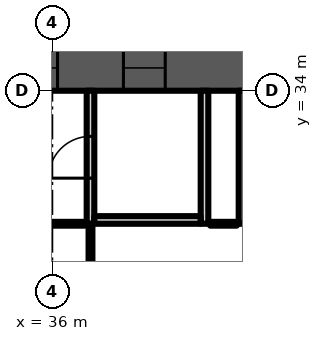
"""IFC4 building model, lengths in metres.
Left out: names, types, materials, properties, quantities, classifications, styles, units other than length and angle.
Written with IfcOpenShell. Run it as: python <this file> out.ifc"""

import sys

from ifc_helpers import new_model, si_unit, direction, frame, frame_2d, origin, place, context, subcontext, project, spatial, rectangle, extrude, element, fill, save


model = new_model("IFC4")
c1 = context("Model", 3, precision=1e-05, world=origin(), true_north=direction((0.0, 1.0)))
c2 = subcontext(c1, "Body", "Model", "MODEL_VIEW")
j1 = project(units=[si_unit("LENGTHUNIT", "METRE"), si_unit("PLANEANGLEUNIT", "RADIAN")], contexts=[c1])
p1 = place(None, origin())
s1 = spatial("IfcSite", under=j1, at=p1, CompositionType="ELEMENT")
p2 = place(p1, origin())
s2 = spatial("IfcBuilding", under=s1, at=p2, CompositionType="ELEMENT")
p3 = place(p2, frame((0.0, 0.0, 81.1)))
s3 = spatial("IfcBuildingStorey", under=s2, at=p3, CompositionType="ELEMENT", Elevation=81.1)
p4 = place(p3, frame((9.0, 34.6, 0.0), z_axis=(0.0, 0.0, 1.0), x_axis=(1.0, 0.0, 0.0)))
e1 = element("IfcWall", 1, at=p4, inside=s3, PredefinedType="SHEAR", context=c2, shape_type="SweptSolid", body=[
    extrude(rectangle(XDim=56.0, YDim=1.2, at=frame_2d((28.0, 0.0))), origin(), (0.0, 0.0, 1.0), 3.6),
])
p5 = place(p4, frame((2.0, 0.0, 0.0)))
e2 = element("IfcOpeningElement", 2, at=p5, cuts=e1, PredefinedType="OPENING", context=c2, shape_type="SweptSolid", body=[
    extrude(rectangle(XDim=1.0, YDim=2.1, at=frame_2d((0.5, 1.05))), frame((0.0, 0.61, 0.0), z_axis=(0.0, -1.0, 0.0), x_axis=(1.0, 0.0, 0.0)), (0.0, 0.0, 1.0), 1.22),
])
p6 = place(p4, frame((4.6, 0.0, 0.0)))
e3 = element("IfcOpeningElement", 3, at=p6, cuts=e1, PredefinedType="OPENING", context=c2, shape_type="SweptSolid", body=[
    extrude(rectangle(XDim=1.0, YDim=2.1, at=frame_2d((0.5, 1.05))), frame((0.0, 0.61, 0.0), z_axis=(0.0, -1.0, 0.0), x_axis=(1.0, 0.0, 0.0)), (0.0, 0.0, 1.0), 1.22),
])
p7 = place(p4, frame((7.867, 0.0, 0.0)))
e4 = element("IfcOpeningElement", 4, at=p7, cuts=e1, PredefinedType="OPENING", context=c2, shape_type="SweptSolid", body=[
    extrude(rectangle(XDim=1.1, YDim=2.1, at=frame_2d((0.55, 1.05))), frame((0.0, 0.61, 0.0), z_axis=(0.0, -1.0, 0.0), x_axis=(1.0, 0.0, 0.0)), (0.0, 0.0, 1.0), 1.22),
])
p8 = place(p4, frame((12.033, 0.0, 0.0)))
e5 = element("IfcOpeningElement", 5, at=p8, cuts=e1, PredefinedType="OPENING", context=c2, shape_type="SweptSolid", body=[
    extrude(rectangle(XDim=1.1, YDim=2.1, at=frame_2d((0.55, 1.05))), frame((0.0, 0.61, 0.0), z_axis=(0.0, -1.0, 0.0), x_axis=(1.0, 0.0, 0.0)), (0.0, 0.0, 1.0), 1.22),
])
p9 = place(p4, frame((9.8, 0.0, 0.0)))
e6 = element("IfcOpeningElement", 6, at=p9, cuts=e1, PredefinedType="OPENING", context=c2, shape_type="SweptSolid", body=[
    extrude(rectangle(XDim=1.4, YDim=2.1, at=frame_2d((0.7, 1.05))), frame((0.0, 0.61, 0.0), z_axis=(0.0, -1.0, 0.0), x_axis=(1.0, 0.0, 0.0)), (0.0, 0.0, 1.0), 1.22),
])
p10 = place(p4, frame((14.65, 0.0, 0.0)))
e7 = element("IfcOpeningElement", 7, at=p10, cuts=e1, PredefinedType="OPENING", context=c2, shape_type="SweptSolid", body=[
    extrude(rectangle(XDim=1.2, YDim=2.1, at=frame_2d((0.6, 1.05))), frame((0.0, 0.61, 0.0), z_axis=(0.0, -1.0, 0.0), x_axis=(1.0, 0.0, 0.0)), (0.0, 0.0, 1.0), 1.22),
])
p11 = place(p4, frame((21.867, 0.0, 0.0)))
e8 = element("IfcOpeningElement", 8, at=p11, cuts=e1, PredefinedType="OPENING", context=c2, shape_type="SweptSolid", body=[
    extrude(rectangle(XDim=1.1, YDim=2.1, at=frame_2d((0.55, 1.05))), frame((0.0, 0.61, 0.0), z_axis=(0.0, -1.0, 0.0), x_axis=(1.0, 0.0, 0.0)), (0.0, 0.0, 1.0), 1.22),
])
p12 = place(p4, frame((26.033, 0.0, 0.0)))
e9 = element("IfcOpeningElement", 9, at=p12, cuts=e1, PredefinedType="OPENING", context=c2, shape_type="SweptSolid", body=[
    extrude(rectangle(XDim=1.1, YDim=2.1, at=frame_2d((0.55, 1.05))), frame((0.0, 0.61, 0.0), z_axis=(0.0, -1.0, 0.0), x_axis=(1.0, 0.0, 0.0)), (0.0, 0.0, 1.0), 1.22),
])
p13 = place(p4, frame((23.8, 0.0, 0.0)))
e10 = element("IfcOpeningElement", 10, at=p13, cuts=e1, PredefinedType="OPENING", context=c2, shape_type="SweptSolid", body=[
    extrude(rectangle(XDim=1.4, YDim=2.1, at=frame_2d((0.7, 1.05))), frame((0.0, 0.61, 0.0), z_axis=(0.0, -1.0, 0.0), x_axis=(1.0, 0.0, 0.0)), (0.0, 0.0, 1.0), 1.22),
])
p14 = place(p4, frame((28.867, 0.0, 0.0)))
e11 = element("IfcOpeningElement", 11, at=p14, cuts=e1, PredefinedType="OPENING", context=c2, shape_type="SweptSolid", body=[
    extrude(rectangle(XDim=1.1, YDim=2.1, at=frame_2d((0.55, 1.05))), frame((0.0, 0.61, 0.0), z_axis=(0.0, -1.0, 0.0), x_axis=(1.0, 0.0, 0.0)), (0.0, 0.0, 1.0), 1.22),
])
p15 = place(p4, frame((33.033, 0.0, 0.0)))
e12 = element("IfcOpeningElement", 12, at=p15, cuts=e1, PredefinedType="OPENING", context=c2, shape_type="SweptSolid", body=[
    extrude(rectangle(XDim=1.1, YDim=2.1, at=frame_2d((0.55, 1.05))), frame((0.0, 0.61, 0.0), z_axis=(0.0, -1.0, 0.0), x_axis=(1.0, 0.0, 0.0)), (0.0, 0.0, 1.0), 1.22),
])
p16 = place(p4, frame((40.15, 0.0, 0.0)))
e13 = element("IfcOpeningElement", 13, at=p16, cuts=e1, PredefinedType="OPENING", context=c2, shape_type="SweptSolid", body=[
    extrude(rectangle(XDim=1.2, YDim=2.1, at=frame_2d((0.6, 1.05))), frame((0.0, 0.61, 0.0), z_axis=(0.0, -1.0, 0.0), x_axis=(1.0, 0.0, 0.0)), (0.0, 0.0, 1.0), 1.22),
])
p17 = place(p4, frame((44.8, 0.0, 0.0)))
e14 = element("IfcOpeningElement", 14, at=p17, cuts=e1, PredefinedType="OPENING", context=c2, shape_type="SweptSolid", body=[
    extrude(rectangle(XDim=1.4, YDim=2.1, at=frame_2d((0.7, 1.05))), frame((0.0, 0.61, 0.0), z_axis=(0.0, -1.0, 0.0), x_axis=(1.0, 0.0, 0.0)), (0.0, 0.0, 1.0), 1.22),
])
p18 = place(p4, frame((49.867, 0.0, 0.0)))
e15 = element("IfcOpeningElement", 15, at=p18, cuts=e1, PredefinedType="OPENING", context=c2, shape_type="SweptSolid", body=[
    extrude(rectangle(XDim=1.1, YDim=2.1, at=frame_2d((0.55, 1.05))), frame((0.0, 0.61, 0.0), z_axis=(0.0, -1.0, 0.0), x_axis=(1.0, 0.0, 0.0)), (0.0, 0.0, 1.0), 1.22),
])
p19 = place(p4, frame((53.5, 0.0, 0.0)))
e16 = element("IfcOpeningElement", 16, at=p19, cuts=e1, PredefinedType="OPENING", context=c2, shape_type="SweptSolid", body=[
    extrude(rectangle(XDim=1.1, YDim=2.1, at=frame_2d((0.55, 1.05))), frame((0.0, 0.61, 0.0), z_axis=(0.0, -1.0, 0.0), x_axis=(1.0, 0.0, 0.0)), (0.0, 0.0, 1.0), 1.22),
])
p20 = place(p4, frame((51.567, 0.0, 0.0)))
e17 = element("IfcOpeningElement", 17, at=p20, cuts=e1, PredefinedType="OPENING", context=c2, shape_type="SweptSolid", body=[
    extrude(rectangle(XDim=1.4, YDim=2.1, at=frame_2d((0.7, 1.05))), frame((0.0, 0.61, 0.0), z_axis=(0.0, -1.0, 0.0), x_axis=(1.0, 0.0, 0.0)), (0.0, 0.0, 1.0), 1.22),
])
p21 = place(p3, frame((37.0, 30.5, 0.0), z_axis=(0.0, 0.0, 1.0), x_axis=(0.0, 1.0, 0.0)))
e18 = element("IfcWall", 18, at=p21, inside=s3, PredefinedType="PARTITIONING", context=c2, shape_type="SweptSolid", body=[
    extrude(rectangle(XDim=3.5, YDim=0.2, at=frame_2d((1.75, 0.0))), origin(), (0.0, 0.0, 1.0), 3.2),
])
p22 = place(p21, frame((1.2, 0.0, 0.0)))
e19 = element("IfcOpeningElement", 19, at=p22, cuts=e18, PredefinedType="OPENING", context=c2, shape_type="SweptSolid", body=[
    extrude(rectangle(XDim=1.1, YDim=2.1, at=frame_2d((0.55, 1.05))), frame((0.0, 0.11, 0.0), z_axis=(0.0, -1.0, 0.0), x_axis=(1.0, 0.0, 0.0)), (0.0, 0.0, 1.0), 0.22),
])
p23 = place(p3, frame((40.0, 30.5, 0.0), z_axis=(0.0, 0.0, 1.0), x_axis=(0.0, 1.0, 0.0)))
e20 = element("IfcWall", 20, at=p23, inside=s3, PredefinedType="PARTITIONING", context=c2, shape_type="SweptSolid", body=[
    extrude(rectangle(XDim=3.5, YDim=0.2, at=frame_2d((1.75, 0.0))), origin(), (0.0, 0.0, 1.0), 3.2),
])
p24 = place(p3, frame((37.1, 30.6, 0.0), z_axis=(0.0, 0.0, 1.0), x_axis=(1.0, 0.0, 0.0)))
e21 = element("IfcWall", 21, at=p24, inside=s3, PredefinedType="PARTITIONING", context=c2, shape_type="SweptSolid", body=[
    extrude(rectangle(XDim=2.8, YDim=0.2, at=frame_2d((1.4, 0.0))), origin(), (0.0, 0.0, 1.0), 3.2),
])
p25 = place(p3, frame((41.0, 30.5, 0.0), z_axis=(0.0, 0.0, 1.0), x_axis=(0.0, 1.0, 0.0)))
e22 = element("IfcWall", 22, at=p25, inside=s3, PredefinedType="PARTITIONING", context=c2, shape_type="SweptSolid", body=[
    extrude(rectangle(XDim=3.5, YDim=0.2, at=frame_2d((1.75, 0.0))), origin(), (0.0, 0.0, 1.0), 3.2),
])
p26 = place(p3, frame((21.94, 30.5, 0.0), z_axis=(0.0, 0.0, 1.0), x_axis=(1.0, 0.0, 0.0)))
e23 = element("IfcWall", 23, at=p26, inside=s3, PredefinedType="PARTITIONING", context=c2, shape_type="SweptSolid", body=[
    extrude(rectangle(XDim=14.91, YDim=0.1, at=frame_2d((7.455, 0.0))), origin(), (0.0, 0.0, 1.0), 3.2),
])
p27 = place(p26, frame((0.345, 0.0, 0.0)))
e24 = element("IfcOpeningElement", 24, at=p27, cuts=e23, PredefinedType="OPENING", context=c2, shape_type="SweptSolid", body=[
    extrude(rectangle(XDim=1.0, YDim=2.1, at=frame_2d((0.5, 1.05))), frame((0.0, 0.06, 0.0), z_axis=(0.0, -1.0, 0.0), x_axis=(1.0, 0.0, 0.0)), (0.0, 0.0, 1.0), 0.12),
])
p28 = place(p26, frame((8.95, 0.0, 0.0)))
e25 = element("IfcOpeningElement", 25, at=p28, cuts=e23, PredefinedType="OPENING", context=c2, shape_type="SweptSolid", body=[
    extrude(rectangle(XDim=1.8, YDim=2.1, at=frame_2d((0.9, 1.05))), frame((0.0, 0.06, 0.0), z_axis=(0.0, -1.0, 0.0), x_axis=(1.0, 0.0, 0.0)), (0.0, 0.0, 1.0), 0.12),
])
p29 = place(p3, frame((37.0, 13.24, 0.0), z_axis=(0.0, 0.0, 1.0), x_axis=(0.0, 1.0, 0.0)))
e26 = element("IfcWall", 26, at=p29, inside=s3, PredefinedType="PARTITIONING", context=c2, shape_type="SweptSolid", body=[
    extrude(rectangle(XDim=17.26, YDim=0.1, at=frame_2d((8.63, 0.0))), origin(), (0.0, 0.0, 1.0), 3.2),
])
p30 = place(p3, frame((40.15, 30.5, 0.0), z_axis=(0.0, 0.0, 1.0), x_axis=(1.0, 0.0, 0.0)))
e27 = element("IfcWall", 27, at=p30, inside=s3, PredefinedType="PARTITIONING", context=c2, shape_type="SweptSolid", body=[
    extrude(rectangle(XDim=0.7, YDim=0.1, at=frame_2d((0.35, 0.0))), origin(), (0.0, 0.0, 1.0), 3.2),
])
p31 = place(p12, origin())
e28 = element("IfcDoor", 28, at=p31, inside=s3, OperationType="DOUBLE_DOOR_SLIDING", PredefinedType="DOOR", context=c2, shape_type="SweptSolid", body=[
    extrude(rectangle(XDim=1.1, YDim=2.1, at=frame_2d((0.55, 1.05))), frame((0.0, 0.025, 0.0), z_axis=(0.0, -1.0, 0.0), x_axis=(1.0, 0.0, 0.0)), (0.0, 0.0, 1.0), 0.05),
])
fill(e9, e28)
p32 = place(p14, origin())
e29 = element("IfcDoor", 29, at=p32, inside=s3, OperationType="DOUBLE_DOOR_SLIDING", PredefinedType="DOOR", context=c2, shape_type="SweptSolid", body=[
    extrude(rectangle(XDim=1.1, YDim=2.1, at=frame_2d((0.55, 1.05))), frame((0.0, 0.025, 0.0), z_axis=(0.0, -1.0, 0.0), x_axis=(1.0, 0.0, 0.0)), (0.0, 0.0, 1.0), 0.05),
])
fill(e11, e29)
p33 = place(p22, origin())
e30 = element("IfcDoor", 30, at=p33, inside=s3, OperationType="SINGLE_SWING_LEFT", PredefinedType="DOOR", context=c2, shape_type="SweptSolid", body=[
    extrude(rectangle(XDim=1.1, YDim=2.1, at=frame_2d((0.55, 1.05))), frame((0.0, 0.025, 0.0), z_axis=(0.0, -1.0, 0.0), x_axis=(1.0, 0.0, 0.0)), (0.0, 0.0, 1.0), 0.05),
])
fill(e19, e30)
save(model, sys.argv[1])
